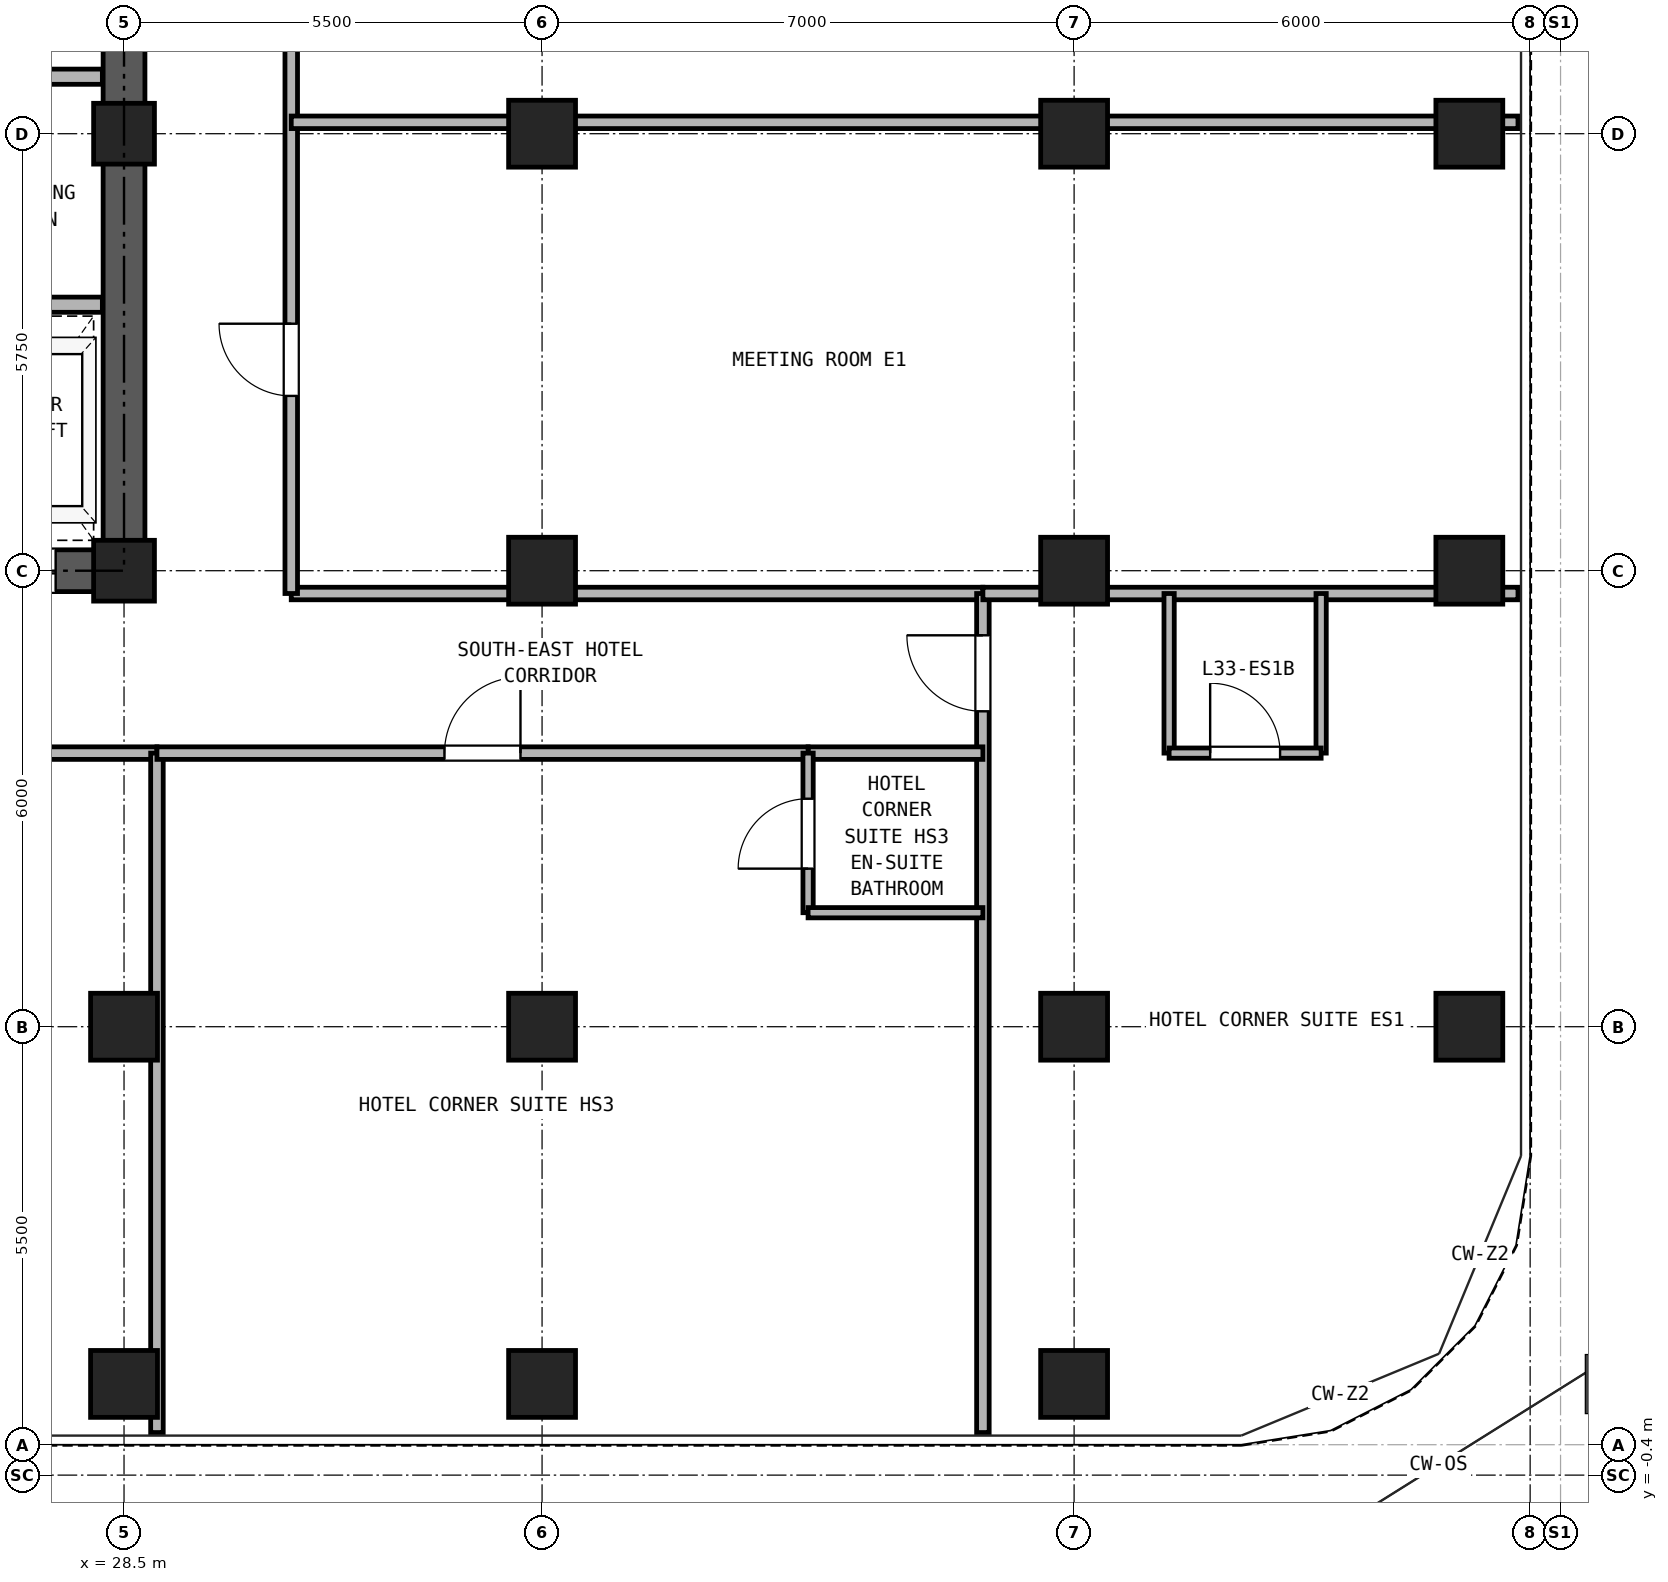
"""IFC4 building model, lengths in metres.
Left out: names, types, materials, properties, quantities, classifications, styles, units other than length and angle.
Written with IfcOpenShell. Run it as: python <this file> out.ifc"""

import sys

from ifc_helpers import new_model, si_unit, direction, frame, frame_2d, origin, origin_2d, place, context, subcontext, project, spatial, rectangle, hollow_rectangle, extrude, source, transform, mapped, element, fill, save


model = new_model("IFC4")
c1 = context("Model", 3, precision=1e-05, world=origin(), true_north=direction((0.0, 1.0)))
c2 = subcontext(c1, "Body", "Model", "MODEL_VIEW")
j1 = project(units=[si_unit("LENGTHUNIT", "METRE"), si_unit("PLANEANGLEUNIT", "RADIAN")], contexts=[c1])
p1 = place(None, origin())
s1 = spatial("IfcSite", under=j1, at=p1, CompositionType="ELEMENT")
p2 = place(p1, origin())
s2 = spatial("IfcBuilding", under=s1, at=p2, CompositionType="ELEMENT")
p3 = place(p2, frame((0.0, 0.0, 121.5)))
s3 = spatial("IfcBuildingStorey", under=s2, at=p3, CompositionType="ELEMENT", Elevation=121.5)
m1 = source(origin(), c2, "Body", "SweptSolid", [
    extrude(hollow_rectangle(XDim=0.88, YDim=0.88, WallThickness=0.05, at=origin_2d()), origin(), (0.0, 0.0, 1.0), 2.95),
])
for number, where, z_axis, x_axis in (
    (1, (28.5, 0.8, 0.0), (0.0, 0.0, 1.0), (1.0, 0.0, 0.0)),
    (2, (34.0, 0.8, 0.0), (0.0, 0.0, 1.0), (1.0, 0.0, 0.0)),
    (3, (41.0, 0.8, 0.0), (0.0, 0.0, 1.0), (1.0, 0.0, 0.0)),
    (4, (46.2, 5.5, 0.0), (0.0, 0.0, 1.0), (1.0, 0.0, 0.0)),
    (5, (46.2, 11.5, 0.0), (0.0, 0.0, 1.0), (1.0, 0.0, 0.0)),
    (6, (46.2, 17.25, 0.0), (0.0, 0.0, 1.0), (1.0, 0.0, 0.0)),
    (7, (28.5, 5.5, 0.0), (0.0, 0.0, 1.0), (1.0, 0.0, 0.0)),
):
    element("IfcColumn", number, at=place(p3, frame(where, z_axis=z_axis, x_axis=x_axis)), inside=s3, PredefinedType="COLUMN", context=c2, shape_type="MappedRepresentation", body=[
        mapped(m1, transform((0.0, 0.0, 0.0), x_axis=(1.0, 0.0, 0.0), y_axis=(0.0, 1.0, 0.0), z_axis=(0.0, 0.0, 1.0), scale=1.0)),
    ])
m2 = source(origin(), c2, "Body", "SweptSolid", [
    extrude(hollow_rectangle(XDim=0.8, YDim=0.8, WallThickness=0.045, at=origin_2d()), origin(), (0.0, 0.0, 1.0), 2.95),
])
for number, where, z_axis, x_axis in (
    (8, (28.5, 11.5, 0.0), (0.0, 0.0, 1.0), (1.0, 0.0, 0.0)),
    (9, (28.5, 17.25, 0.0), (0.0, 0.0, 1.0), (1.0, 0.0, 0.0)),
):
    element("IfcColumn", number, at=place(p3, frame(where, z_axis=z_axis, x_axis=x_axis)), inside=s3, PredefinedType="COLUMN", context=c2, shape_type="MappedRepresentation", body=[
        mapped(m2, transform((0.0, 0.0, 0.0), x_axis=(1.0, 0.0, 0.0), y_axis=(0.0, 1.0, 0.0), z_axis=(0.0, 0.0, 1.0), scale=1.0)),
    ])
for number, where, z_axis, x_axis in (
    (10, (34.0, 5.5, 0.0), (0.0, 0.0, 1.0), (1.0, 0.0, 0.0)),
    (11, (34.0, 11.5, 0.0), (0.0, 0.0, 1.0), (1.0, 0.0, 0.0)),
    (12, (34.0, 17.25, 0.0), (0.0, 0.0, 1.0), (1.0, 0.0, 0.0)),
    (13, (41.0, 5.5, 0.0), (0.0, 0.0, 1.0), (1.0, 0.0, 0.0)),
    (14, (41.0, 11.5, 0.0), (0.0, 0.0, 1.0), (1.0, 0.0, 0.0)),
    (15, (41.0, 17.25, 0.0), (0.0, 0.0, 1.0), (1.0, 0.0, 0.0)),
):
    element("IfcColumn", number, at=place(p3, frame(where, z_axis=z_axis, x_axis=x_axis)), inside=s3, PredefinedType="COLUMN", context=c2, shape_type="MappedRepresentation", body=[
        mapped(m1, transform((0.0, 0.0, 0.0), x_axis=(1.0, 0.0, 0.0), y_axis=(0.0, 1.0, 0.0), z_axis=(0.0, 0.0, 1.0), scale=1.0)),
    ])
p4 = place(p3, frame((18.225, 11.5, 0.0), z_axis=(0.0, 0.0, 1.0), x_axis=(1.0, 0.0, 0.0)))
e16 = element("IfcWall", 16, at=p4, inside=s3, PredefinedType="SHEAR", context=c2, shape_type="SweptSolid", body=[
    extrude(rectangle(XDim=10.55, YDim=0.55, at=frame_2d((5.275, 0.0))), origin(), (0.0, 0.0, 1.0), 2.95),
])
p5 = place(p4, frame((2.375, 0.0, 0.0)))
e17 = element("IfcOpeningElement", 17, at=p5, cuts=e16, PredefinedType="OPENING", context=c2, shape_type="SweptSolid", body=[
    extrude(rectangle(XDim=0.95, YDim=2.15, at=frame_2d((0.475, 1.075))), frame((0.0, 0.285, 0.0), z_axis=(0.0, -1.0, 0.0), x_axis=(1.0, 0.0, 0.0)), (0.0, 0.0, 1.0), 0.57),
])
p6 = place(p4, frame((5.875, 0.0, 0.0)))
e18 = element("IfcOpeningElement", 18, at=p6, cuts=e16, PredefinedType="OPENING", context=c2, shape_type="SweptSolid", body=[
    extrude(rectangle(XDim=1.1, YDim=2.25, at=frame_2d((0.55, 1.125))), frame((0.0, 0.285, 0.0), z_axis=(0.0, -1.0, 0.0), x_axis=(1.0, 0.0, 0.0)), (0.0, 0.0, 1.0), 0.57),
])
p7 = place(p4, frame((8.275, 0.0, 0.0)))
e19 = element("IfcOpeningElement", 19, at=p7, cuts=e16, PredefinedType="OPENING", context=c2, shape_type="SweptSolid", body=[
    extrude(rectangle(XDim=1.1, YDim=2.25, at=frame_2d((0.55, 1.125))), frame((0.0, 0.285, 0.0), z_axis=(0.0, -1.0, 0.0), x_axis=(1.0, 0.0, 0.0)), (0.0, 0.0, 1.0), 0.57),
])
p8 = place(p3, frame((28.5, 11.775, 0.0), z_axis=(0.0, 0.0, 1.0), x_axis=(0.0, 1.0, 0.0)))
e20 = element("IfcWall", 20, at=p8, inside=s3, PredefinedType="SHEAR", context=c2, shape_type="SweptSolid", body=[
    extrude(rectangle(XDim=16.7, YDim=0.55, at=frame_2d((8.35, 0.0))), origin(), (0.0, 0.0, 1.0), 2.95),
])
p9 = place(p8, frame((7.375, 0.0, 0.0)))
e21 = element("IfcOpeningElement", 21, at=p9, cuts=e20, PredefinedType="OPENING", context=c2, shape_type="SweptSolid", body=[
    extrude(rectangle(XDim=1.15, YDim=2.2, at=frame_2d((0.575, 1.1))), frame((0.0, 0.285, 0.0), z_axis=(0.0, -1.0, 0.0), x_axis=(1.0, 0.0, 0.0)), (0.0, 0.0, 1.0), 0.57),
])
p10 = place(p3, frame((18.785, 18.0, 0.0), z_axis=(0.0, 0.0, 1.0), x_axis=(1.0, 0.0, 0.0)))
e22 = element("IfcWall", 22, at=p10, inside=s3, PredefinedType="PARTITIONING", context=c2, shape_type="SweptSolid", body=[
    extrude(rectangle(XDim=9.43, YDim=0.2, at=frame_2d((4.715, 0.0))), origin(), (0.0, 0.0, 1.0), 2.95),
])
p11 = place(p10, frame((0.465, 0.0, 0.0)))
e23 = element("IfcOpeningElement", 23, at=p11, cuts=e22, PredefinedType="OPENING", context=c2, shape_type="SweptSolid", body=[
    extrude(rectangle(XDim=1.3, YDim=2.3, at=frame_2d((0.65, 1.15))), frame((0.0, 0.11, 0.0), z_axis=(0.0, -1.0, 0.0), x_axis=(1.0, 0.0, 0.0)), (0.0, 0.0, 1.0), 0.22),
])
p12 = place(p10, frame((2.565, 0.0, 0.0)))
e24 = element("IfcOpeningElement", 24, at=p12, cuts=e22, PredefinedType="OPENING", context=c2, shape_type="SweptSolid", body=[
    extrude(rectangle(XDim=1.3, YDim=2.3, at=frame_2d((0.65, 1.15))), frame((0.0, 0.11, 0.0), z_axis=(0.0, -1.0, 0.0), x_axis=(1.0, 0.0, 0.0)), (0.0, 0.0, 1.0), 0.22),
])
p13 = place(p10, frame((4.965, 0.0, 0.0)))
e25 = element("IfcOpeningElement", 25, at=p13, cuts=e22, PredefinedType="OPENING", context=c2, shape_type="SweptSolid", body=[
    extrude(rectangle(XDim=0.9, YDim=2.05, at=frame_2d((0.45, 1.025))), frame((0.0, 0.11, 0.0), z_axis=(0.0, -1.0, 0.0), x_axis=(1.0, 0.0, 0.0)), (0.0, 0.0, 1.0), 0.22),
])
p14 = place(p10, frame((7.665, 0.0, 0.0)))
e26 = element("IfcOpeningElement", 26, at=p14, cuts=e22, PredefinedType="OPENING", context=c2, shape_type="SweptSolid", body=[
    extrude(rectangle(XDim=0.9, YDim=2.05, at=frame_2d((0.45, 1.025))), frame((0.0, 0.11, 0.0), z_axis=(0.0, -1.0, 0.0), x_axis=(1.0, 0.0, 0.0)), (0.0, 0.0, 1.0), 0.22),
])
p15 = place(p3, frame((18.785, 15.0, 0.0), z_axis=(0.0, 0.0, 1.0), x_axis=(1.0, 0.0, 0.0)))
e27 = element("IfcWall", 27, at=p15, inside=s3, PredefinedType="PARTITIONING", context=c2, shape_type="SweptSolid", body=[
    extrude(rectangle(XDim=9.43, YDim=0.2, at=frame_2d((4.715, 0.0))), origin(), (0.0, 0.0, 1.0), 2.95),
])
p16 = place(p3, frame((30.7, 11.2, 0.0), z_axis=(0.0, 0.0, 1.0), x_axis=(1.0, 0.0, 0.0)))
e28 = element("IfcWall", 28, at=p16, inside=s3, PredefinedType="PARTITIONING", context=c2, shape_type="SweptSolid", body=[
    extrude(rectangle(XDim=9.1, YDim=0.165, at=frame_2d((4.55, 0.0))), origin(), (0.0, 0.0, 1.0), 2.95),
])
p17 = place(p3, frame((30.7, 11.2, 0.0), z_axis=(0.0, 0.0, 1.0), x_axis=(0.0, 1.0, 0.0)))
e29 = element("IfcWall", 29, at=p17, inside=s3, PredefinedType="PARTITIONING", context=c2, shape_type="SweptSolid", body=[
    extrude(rectangle(XDim=18.75, YDim=0.165, at=frame_2d((9.375, 0.0))), origin(), (0.0, 0.0, 1.0), 2.95),
])
p18 = place(p17, frame((2.6, 0.0, 0.0)))
e30 = element("IfcOpeningElement", 30, at=p18, cuts=e29, PredefinedType="OPENING", context=c2, shape_type="SweptSolid", body=[
    extrude(rectangle(XDim=0.95, YDim=2.15, at=frame_2d((0.475, 1.075))), frame((0.0, 0.093, 0.0), z_axis=(0.0, -1.0, 0.0), x_axis=(1.0, 0.0, 0.0)), (0.0, 0.0, 1.0), 0.185),
])
p19 = place(p17, frame((8.8, 0.0, 0.0)))
e31 = element("IfcOpeningElement", 31, at=p19, cuts=e29, PredefinedType="OPENING", context=c2, shape_type="SweptSolid", body=[
    extrude(rectangle(XDim=0.95, YDim=2.15, at=frame_2d((0.475, 1.075))), frame((0.0, 0.093, 0.0), z_axis=(0.0, -1.0, 0.0), x_axis=(1.0, 0.0, 0.0)), (0.0, 0.0, 1.0), 0.185),
])
p20 = place(p17, frame((15.075, 0.0, 0.0)))
e32 = element("IfcOpeningElement", 32, at=p20, cuts=e29, PredefinedType="OPENING", context=c2, shape_type="SweptSolid", body=[
    extrude(rectangle(XDim=0.95, YDim=2.15, at=frame_2d((0.475, 1.075))), frame((0.0, 0.093, 0.0), z_axis=(0.0, -1.0, 0.0), x_axis=(1.0, 0.0, 0.0)), (0.0, 0.0, 1.0), 0.185),
])
p21 = place(p3, frame((39.8, 0.16, 0.0), z_axis=(0.0, 0.0, 1.0), x_axis=(0.0, 1.0, 0.0)))
e33 = element("IfcWall", 33, at=p21, inside=s3, PredefinedType="PARTITIONING", context=c2, shape_type="SweptSolid", body=[
    extrude(rectangle(XDim=11.04, YDim=0.165, at=frame_2d((5.52, 0.0))), origin(), (0.0, 0.0, 1.0), 2.95),
])
p22 = place(p21, frame((9.49, 0.0, 0.0)))
e34 = element("IfcOpeningElement", 34, at=p22, cuts=e33, PredefinedType="OPENING", context=c2, shape_type="SweptSolid", body=[
    extrude(rectangle(XDim=1.0, YDim=2.15, at=frame_2d((0.5, 1.075))), frame((0.0, 0.093, 0.0), z_axis=(0.0, -1.0, 0.0), x_axis=(1.0, 0.0, 0.0)), (0.0, 0.0, 1.0), 0.185),
])
p23 = place(p3, frame((39.8, 11.2, 0.0), z_axis=(0.0, 0.0, 1.0), x_axis=(1.0, 0.0, 0.0)))
e35 = element("IfcWall", 35, at=p23, inside=s3, PredefinedType="PARTITIONING", context=c2, shape_type="SweptSolid", body=[
    extrude(rectangle(XDim=7.04, YDim=0.165, at=frame_2d((3.52, 0.0))), origin(), (0.0, 0.0, 1.0), 2.95),
])
for number, where, z_axis, x_axis in (
    (36, (42.25, 9.1, 0.0), (0.0, 0.0, 1.0), (0.0, 1.0, 0.0)),
    (37, (44.25, 9.1, 0.0), (0.0, 0.0, 1.0), (0.0, 1.0, 0.0)),
):
    element("IfcWall", number, at=place(p3, frame(where, z_axis=z_axis, x_axis=x_axis)), inside=s3, PredefinedType="PARTITIONING", context=c2, shape_type="SweptSolid", body=[
        extrude(rectangle(XDim=2.1, YDim=0.135, at=frame_2d((1.05, 0.0))), origin(), (0.0, 0.0, 1.0), 2.95),
    ])
p24 = place(p3, frame((42.25, 9.1, 0.0), z_axis=(0.0, 0.0, 1.0), x_axis=(1.0, 0.0, 0.0)))
e38 = element("IfcWall", 38, at=p24, inside=s3, PredefinedType="PARTITIONING", context=c2, shape_type="SweptSolid", body=[
    extrude(rectangle(XDim=2.0, YDim=0.135, at=frame_2d((1.0, 0.0))), origin(), (0.0, 0.0, 1.0), 2.95),
])
p25 = place(p24, frame((0.54, 0.0, 0.0)))
e39 = element("IfcOpeningElement", 39, at=p25, cuts=e38, PredefinedType="OPENING", context=c2, shape_type="SweptSolid", body=[
    extrude(rectangle(XDim=0.92, YDim=2.1, at=frame_2d((0.46, 1.05))), frame((0.0, 0.077, 0.0), z_axis=(0.0, -1.0, 0.0), x_axis=(1.0, 0.0, 0.0)), (0.0, 0.0, 1.0), 0.155),
])
p26 = place(p3, frame((20.367, 9.1, 0.0), z_axis=(0.0, 0.0, 1.0), x_axis=(1.0, 0.0, 0.0)))
e40 = element("IfcWall", 40, at=p26, inside=s3, PredefinedType="PARTITIONING", context=c2, shape_type="SweptSolid", body=[
    extrude(rectangle(XDim=8.566, YDim=0.165, at=frame_2d((4.283, 0.0))), origin(), (0.0, 0.0, 1.0), 2.95),
])
p27 = place(p26, frame((3.783, 0.0, 0.0)))
e41 = element("IfcOpeningElement", 41, at=p27, cuts=e40, PredefinedType="OPENING", context=c2, shape_type="SweptSolid", body=[
    extrude(rectangle(XDim=1.0, YDim=2.15, at=frame_2d((0.5, 1.075))), frame((0.0, 0.093, 0.0), z_axis=(0.0, -1.0, 0.0), x_axis=(1.0, 0.0, 0.0)), (0.0, 0.0, 1.0), 0.185),
])
p28 = place(p3, frame((28.933, 0.16, 0.0), z_axis=(0.0, 0.0, 1.0), x_axis=(0.0, 1.0, 0.0)))
e42 = element("IfcWall", 42, at=p28, inside=s3, PredefinedType="PARTITIONING", context=c2, shape_type="SweptSolid", body=[
    extrude(rectangle(XDim=8.94, YDim=0.165, at=frame_2d((4.47, 0.0))), origin(), (0.0, 0.0, 1.0), 2.95),
])
p29 = place(p3, frame((37.5, 9.1, 0.0), z_axis=(0.0, 0.0, 1.0), x_axis=(1.0, 0.0, 0.0)))
e43 = element("IfcWall", 43, at=p29, inside=s3, PredefinedType="PARTITIONING", context=c2, shape_type="SweptSolid", body=[
    extrude(rectangle(XDim=2.3, YDim=0.165, at=frame_2d((1.15, 0.0))), origin(), (0.0, 0.0, 1.0), 2.95),
])
p30 = place(p3, frame((28.933, 9.1, 0.0), z_axis=(0.0, 0.0, 1.0), x_axis=(1.0, 0.0, 0.0)))
e44 = element("IfcWall", 44, at=p30, inside=s3, PredefinedType="PARTITIONING", context=c2, shape_type="SweptSolid", body=[
    extrude(rectangle(XDim=8.567, YDim=0.165, at=frame_2d((4.283, 0.0))), origin(), (0.0, 0.0, 1.0), 2.95),
])
p31 = place(p30, frame((3.783, 0.0, 0.0)))
e45 = element("IfcOpeningElement", 45, at=p31, cuts=e44, PredefinedType="OPENING", context=c2, shape_type="SweptSolid", body=[
    extrude(rectangle(XDim=1.0, YDim=2.15, at=frame_2d((0.5, 1.075))), frame((0.0, 0.093, 0.0), z_axis=(0.0, -1.0, 0.0), x_axis=(1.0, 0.0, 0.0)), (0.0, 0.0, 1.0), 0.185),
])
p32 = place(p3, frame((37.5, 7.0, 0.0), z_axis=(0.0, 0.0, 1.0), x_axis=(0.0, 1.0, 0.0)))
e46 = element("IfcWall", 46, at=p32, inside=s3, PredefinedType="PARTITIONING", context=c2, shape_type="SweptSolid", body=[
    extrude(rectangle(XDim=2.1, YDim=0.135, at=frame_2d((1.05, 0.0))), origin(), (0.0, 0.0, 1.0), 2.95),
])
p33 = place(p32, frame((0.58, 0.0, 0.0)))
e47 = element("IfcOpeningElement", 47, at=p33, cuts=e46, PredefinedType="OPENING", context=c2, shape_type="SweptSolid", body=[
    extrude(rectangle(XDim=0.92, YDim=2.1, at=frame_2d((0.46, 1.05))), frame((0.0, 0.077, 0.0), z_axis=(0.0, -1.0, 0.0), x_axis=(1.0, 0.0, 0.0)), (0.0, 0.0, 1.0), 0.155),
])
p34 = place(p3, frame((37.5, 7.0, 0.0), z_axis=(0.0, 0.0, 1.0), x_axis=(1.0, 0.0, 0.0)))
e48 = element("IfcWall", 48, at=p34, inside=s3, PredefinedType="PARTITIONING", context=c2, shape_type="SweptSolid", body=[
    extrude(rectangle(XDim=2.3, YDim=0.135, at=frame_2d((1.15, 0.0))), origin(), (0.0, 0.0, 1.0), 2.95),
])
p35 = place(p3, frame((30.7, 17.4, 0.0), z_axis=(0.0, 0.0, 1.0), x_axis=(1.0, 0.0, 0.0)))
e49 = element("IfcWall", 49, at=p35, inside=s3, PredefinedType="PARTITIONING", context=c2, shape_type="SweptSolid", body=[
    extrude(rectangle(XDim=16.14, YDim=0.165, at=frame_2d((8.07, 0.0))), origin(), (0.0, 0.0, 1.0), 2.247),
])
p36 = place(p7, frame((1.1, 0.0, 0.0), z_axis=(0.0, 0.0, 1.0), x_axis=(-1.0, 0.0, 0.0)))
e50 = element("IfcDoor", 50, at=p36, inside=s3, OperationType="DOUBLE_DOOR_SLIDING", PredefinedType="DOOR", context=c2, shape_type="SweptSolid", body=[
    extrude(rectangle(XDim=1.1, YDim=2.25, at=frame_2d((0.55, 1.125))), frame((0.0, 0.025, 0.0), z_axis=(0.0, -1.0, 0.0), x_axis=(1.0, 0.0, 0.0)), (0.0, 0.0, 1.0), 0.05),
])
fill(e19, e50)
p37 = place(p25, origin())
e51 = element("IfcDoor", 51, at=p37, inside=s3, OperationType="SINGLE_SWING_LEFT", PredefinedType="DOOR", context=c2, shape_type="SweptSolid", body=[
    extrude(rectangle(XDim=0.92, YDim=2.1, at=frame_2d((0.46, 1.05))), frame((0.0, 0.025, 0.0), z_axis=(0.0, -1.0, 0.0), x_axis=(1.0, 0.0, 0.0)), (0.0, 0.0, 1.0), 0.05),
])
fill(e39, e51)
p38 = place(p22, frame((1.0, 0.0, 0.0), z_axis=(0.0, 0.0, 1.0), x_axis=(-1.0, 0.0, 0.0)))
e52 = element("IfcDoor", 52, at=p38, inside=s3, OperationType="SINGLE_SWING_RIGHT", PredefinedType="DOOR", context=c2, shape_type="SweptSolid", body=[
    extrude(rectangle(XDim=1.0, YDim=2.15, at=frame_2d((0.5, 1.075))), frame((0.0, 0.025, 0.0), z_axis=(0.0, -1.0, 0.0), x_axis=(1.0, 0.0, 0.0)), (0.0, 0.0, 1.0), 0.05),
])
fill(e34, e52)
p39 = place(p33, origin())
e53 = element("IfcDoor", 53, at=p39, inside=s3, OperationType="SINGLE_SWING_LEFT", PredefinedType="DOOR", context=c2, shape_type="SweptSolid", body=[
    extrude(rectangle(XDim=0.92, YDim=2.1, at=frame_2d((0.46, 1.05))), frame((0.0, 0.025, 0.0), z_axis=(0.0, -1.0, 0.0), x_axis=(1.0, 0.0, 0.0)), (0.0, 0.0, 1.0), 0.05),
])
fill(e47, e53)
p40 = place(p31, frame((1.0, 0.0, 0.0), z_axis=(0.0, 0.0, 1.0), x_axis=(-1.0, 0.0, 0.0)))
e54 = element("IfcDoor", 54, at=p40, inside=s3, OperationType="SINGLE_SWING_RIGHT", PredefinedType="DOOR", context=c2, shape_type="SweptSolid", body=[
    extrude(rectangle(XDim=1.0, YDim=2.15, at=frame_2d((0.5, 1.075))), frame((0.0, 0.025, 0.0), z_axis=(0.0, -1.0, 0.0), x_axis=(1.0, 0.0, 0.0)), (0.0, 0.0, 1.0), 0.05),
])
fill(e45, e54)
p41 = place(p18, origin())
e55 = element("IfcDoor", 55, at=p41, inside=s3, OperationType="SINGLE_SWING_RIGHT", PredefinedType="DOOR", context=c2, shape_type="SweptSolid", body=[
    extrude(rectangle(XDim=0.95, YDim=2.15, at=frame_2d((0.475, 1.075))), frame((0.0, 0.025, 0.0), z_axis=(0.0, -1.0, 0.0), x_axis=(1.0, 0.0, 0.0)), (0.0, 0.0, 1.0), 0.05),
])
fill(e30, e55)
save(model, sys.argv[1])
